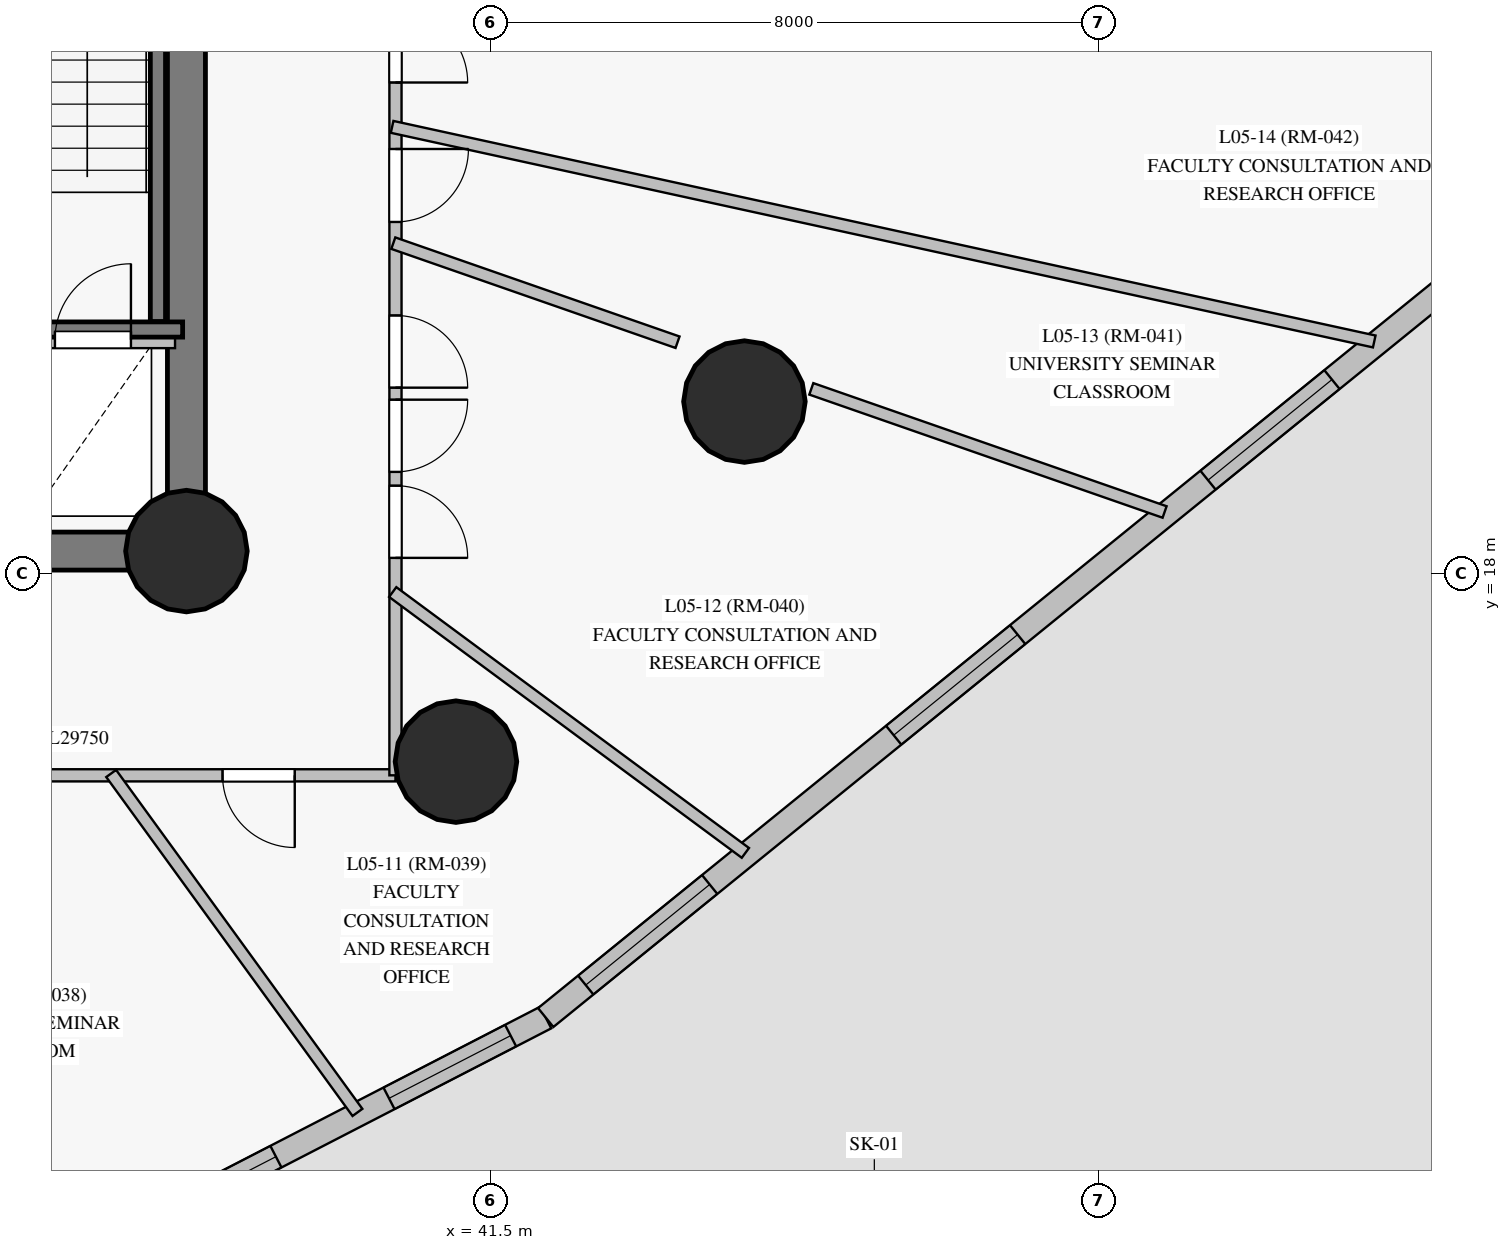
"""IFC4 building model, lengths in metres.
Left out: names, types, materials, properties, quantities, classifications, styles, units other than length and angle.
Written with IfcOpenShell. Run it as: python <this file> out.ifc"""

import sys

from ifc_helpers import new_model, si_unit, direction, frame, frame_2d, origin, origin_with_axes, origin_2d, place, context, subcontext, project, spatial, rectangle, circle, extrude, source, transform, mapped, element, fill, save


model = new_model("IFC4")
c1 = context("Model", 3, precision=1e-05, world=origin(), true_north=direction((0.0, 1.0)))
c2 = subcontext(c1, "Body", "Model", "MODEL_VIEW")
j1 = project(units=[si_unit("LENGTHUNIT", "METRE"), si_unit("PLANEANGLEUNIT", "RADIAN")], contexts=[c1])
p1 = place(None, origin())
s1 = spatial("IfcSite", under=j1, at=p1, CompositionType="ELEMENT")
p2 = place(p1, origin())
s2 = spatial("IfcBuilding", under=s1, at=p2, CompositionType="ELEMENT")
p3 = place(p2, frame((0.0, 0.0, 22.5)))
s3 = spatial("IfcBuildingStorey", under=s2, at=p3, CompositionType="ELEMENT", Elevation=22.5)
p4 = place(p3, frame((26.55, 18.3, 0.0), z_axis=(0.0, 0.0, 1.0), x_axis=(1.0, 0.0, 0.0)))
e1 = element("IfcWall", 1, at=p4, inside=s3, PredefinedType="SHEAR", context=c2, shape_type="SweptSolid", body=[
    extrude(rectangle(XDim=10.95, YDim=0.5, at=frame_2d((5.475, 0.0))), origin(), (0.0, 0.0, 1.0), 3.75),
])
p5 = place(p4, frame((4.55, 0.0, 0.0)))
e2 = element("IfcOpeningElement", 2, at=p5, cuts=e1, PredefinedType="OPENING", context=c2, shape_type="SweptSolid", body=[
    extrude(rectangle(XDim=1.4, YDim=2.2, at=frame_2d((0.7, 1.1))), frame((0.0, 0.26, 0.0), z_axis=(0.0, -1.0, 0.0), x_axis=(1.0, 0.0, 0.0)), (0.0, 0.0, 1.0), 0.52),
])
p6 = place(p3, frame((37.5, 18.3, 0.0), z_axis=(0.0, 0.0, 1.0), x_axis=(0.0, 1.0, 0.0)))
e3 = element("IfcWall", 3, at=p6, inside=s3, PredefinedType="SHEAR", context=c2, shape_type="SweptSolid", body=[
    extrude(rectangle(XDim=16.4, YDim=0.5, at=frame_2d((8.2, 0.0))), origin(), (0.0, 0.0, 1.0), 3.75),
])
p7 = place(p6, frame((14.06, 0.0, 0.0)))
e4 = element("IfcOpeningElement", 4, at=p7, cuts=e3, PredefinedType="OPENING", context=c2, shape_type="SweptSolid", body=[
    extrude(rectangle(XDim=1.2, YDim=2.15, at=frame_2d((0.6, 1.075))), frame((0.0, 0.26, 0.0), z_axis=(0.0, -1.0, 0.0), x_axis=(1.0, 0.0, 0.0)), (0.0, 0.0, 1.0), 0.52),
])
m1 = source(origin_with_axes(), c2, "Body", "SweptSolid", [
    extrude(circle(Radius=0.8, at=origin_2d()), origin(), (0.0, 0.0, 1.0), 4.0),
])
for number, where, z_axis, x_axis in (
    (5, (37.5, 18.3, 0.0), (0.0, 0.0, 1.0), (1.0, 0.0, 0.0)),
    (6, (44.841, 20.267, 0.0), (0.0, 0.0, 1.0), (1.0, 0.0, 0.0)),
    (7, (41.046, 15.53, 0.0), (0.0, 0.0, 1.0), (1.0, 0.0, 0.0)),
):
    element("IfcColumn", number, at=place(p3, frame(where, z_axis=z_axis, x_axis=x_axis)), inside=s3, PredefinedType="COLUMN", context=c2, shape_type="MappedRepresentation", body=[
        mapped(m1, transform((0.0, 0.0, 0.0), scale=1.0)),
    ])
p8 = place(p3, frame((32.221, 7.003, 0.0), z_axis=(0.0, 0.0, 1.0), x_axis=(0.888779978747, 0.458334102352, 0.0)))
e8 = element("IfcWall", 8, at=p8, inside=s3, PredefinedType="SOLIDWALL", context=c2, shape_type="SweptSolid", body=[
    extrude(rectangle(XDim=11.258, YDim=0.32, at=frame_2d((5.629, 0.0))), origin(), (0.0, 0.0, 1.0), 3.75),
])
p9 = place(p8, frame((5.164, 0.0, 0.85)))
e9 = element("IfcOpeningElement", 9, at=p9, cuts=e8, PredefinedType="OPENING", context=c2, shape_type="SweptSolid", body=[
    extrude(rectangle(XDim=2.1, YDim=1.95, at=frame_2d((1.05, 0.975))), frame((0.0, 0.17, 0.0), z_axis=(0.0, -1.0, 0.0), x_axis=(1.0, 0.0, 0.0)), (0.0, 0.0, 1.0), 0.34),
])
p10 = place(p8, frame((8.938, 0.0, 0.85)))
e10 = element("IfcOpeningElement", 10, at=p10, cuts=e8, PredefinedType="OPENING", context=c2, shape_type="SweptSolid", body=[
    extrude(rectangle(XDim=1.8, YDim=1.85, at=frame_2d((0.9, 0.925))), frame((0.0, 0.17, 0.0), z_axis=(0.0, -1.0, 0.0), x_axis=(1.0, 0.0, 0.0)), (0.0, 0.0, 1.0), 0.34),
])
p11 = place(p8, frame((1.351, 0.0, 0.0)))
e11 = element("IfcOpeningElement", 11, at=p11, cuts=e8, PredefinedType="OPENING", context=c2, shape_type="SweptSolid", body=[
    extrude(rectangle(XDim=1.05, YDim=2.12, at=frame_2d((0.525, 1.06))), frame((0.0, 0.17, 0.0), z_axis=(0.0, -1.0, 0.0), x_axis=(1.0, 0.0, 0.0)), (0.0, 0.0, 1.0), 0.34),
])
p12 = place(p3, frame((42.227, 12.163, 0.0), z_axis=(0.0, 0.0, 1.0), x_axis=(0.776540545202, 0.630067283437, 0.0)))
e12 = element("IfcWall", 12, at=p12, inside=s3, PredefinedType="SOLIDWALL", context=c2, shape_type="SweptSolid", body=[
    extrude(rectangle(XDim=16.188, YDim=0.32, at=frame_2d((8.094, 0.0))), origin(), (0.0, 0.0, 1.0), 3.75),
])
p13 = place(p12, frame((0.678, 0.0, 0.85)))
e13 = element("IfcOpeningElement", 13, at=p13, cuts=e12, PredefinedType="OPENING", context=c2, shape_type="SweptSolid", body=[
    extrude(rectangle(XDim=2.1, YDim=1.95, at=frame_2d((1.05, 0.975))), frame((0.0, 0.17, 0.0), z_axis=(0.0, -1.0, 0.0), x_axis=(1.0, 0.0, 0.0)), (0.0, 0.0, 1.0), 0.34),
])
p14 = place(p12, frame((5.896, 0.0, 0.85)))
e14 = element("IfcOpeningElement", 14, at=p14, cuts=e12, PredefinedType="OPENING", context=c2, shape_type="SweptSolid", body=[
    extrude(rectangle(XDim=2.1, YDim=1.95, at=frame_2d((1.05, 0.975))), frame((0.0, 0.17, 0.0), z_axis=(0.0, -1.0, 0.0), x_axis=(1.0, 0.0, 0.0)), (0.0, 0.0, 1.0), 0.34),
])
p15 = place(p12, frame((11.221, 0.0, 0.85)))
e15 = element("IfcOpeningElement", 15, at=p15, cuts=e12, PredefinedType="OPENING", context=c2, shape_type="SweptSolid", body=[
    extrude(rectangle(XDim=2.1, YDim=1.95, at=frame_2d((1.05, 0.975))), frame((0.0, 0.17, 0.0), z_axis=(0.0, -1.0, 0.0), x_axis=(1.0, 0.0, 0.0)), (0.0, 0.0, 1.0), 0.34),
])
p16 = place(p3, frame((35.32, 21.08, 0.0), z_axis=(0.0, 0.0, 1.0), x_axis=(1.0, 0.0, 0.0)))
e16 = element("IfcWall", 16, at=p16, inside=s3, PredefinedType="SHEAR", context=c2, shape_type="SweptSolid", body=[
    extrude(rectangle(XDim=2.03, YDim=0.22, at=frame_2d((1.015, 0.0))), origin(), (0.0, 0.0, 1.0), 2.45),
])
p17 = place(p16, frame((0.45, 0.0, 0.0)))
e17 = element("IfcOpeningElement", 17, at=p17, cuts=e16, PredefinedType="OPENING", context=c2, shape_type="SweptSolid", body=[
    extrude(rectangle(XDim=1.0, YDim=2.05, at=frame_2d((0.5, 1.025))), frame((0.0, 0.12, 0.0), z_axis=(0.0, -1.0, 0.0), x_axis=(1.0, 0.0, 0.0)), (0.0, 0.0, 1.0), 0.24),
])
p18 = place(p3, frame((37.125, 21.32, 0.0), z_axis=(0.0, 0.0, 1.0), x_axis=(0.0, 1.0, 0.0)))
e18 = element("IfcWall", 18, at=p18, inside=s3, PredefinedType="SHEAR", context=c2, shape_type="SweptSolid", body=[
    extrude(rectangle(XDim=7.5, YDim=0.2, at=frame_2d((3.75, 0.0))), origin(), (0.0, 0.0, 1.0), 3.75),
])
p19 = place(p3, frame((33.455, 21.215, 0.0), z_axis=(0.0, 0.0, 1.0), x_axis=(1.0, 0.0, 0.0)))
e19 = element("IfcWall", 19, at=p19, inside=s3, PredefinedType="SHEAR", context=c2, shape_type="SweptSolid", body=[
    extrude(rectangle(XDim=3.995, YDim=0.2, at=frame_2d((1.998, 0.0))), origin(), (0.0, 0.0, 1.0), 3.75),
])
p20 = place(p3, frame((40.25, 15.35, 0.0), z_axis=(0.0, 0.0, 1.0), x_axis=(-1.0, 0.0, 0.0)))
e20 = element("IfcWall", 20, at=p20, inside=s3, PredefinedType="PARTITIONING", context=c2, shape_type="SweptSolid", body=[
    extrude(rectangle(XDim=29.75, YDim=0.16, at=frame_2d((14.875, 0.0))), origin(), (0.0, 0.0, 1.0), 3.1),
])
p21 = place(p20, frame((26.803, 0.0, 0.0)))
e21 = element("IfcOpeningElement", 21, at=p21, cuts=e20, PredefinedType="OPENING", context=c2, shape_type="SweptSolid", body=[
    extrude(rectangle(XDim=0.95, YDim=2.15, at=frame_2d((0.475, 1.075))), frame((0.0, 0.09, 0.0), z_axis=(0.0, -1.0, 0.0), x_axis=(1.0, 0.0, 0.0)), (0.0, 0.0, 1.0), 0.18),
])
p22 = place(p20, frame((23.18, 0.0, 0.0)))
e22 = element("IfcOpeningElement", 22, at=p22, cuts=e20, PredefinedType="OPENING", context=c2, shape_type="SweptSolid", body=[
    extrude(rectangle(XDim=0.95, YDim=2.15, at=frame_2d((0.475, 1.075))), frame((0.0, 0.09, 0.0), z_axis=(0.0, -1.0, 0.0), x_axis=(1.0, 0.0, 0.0)), (0.0, 0.0, 1.0), 0.18),
])
p23 = place(p20, frame((21.097, 0.0, 0.0)))
e23 = element("IfcOpeningElement", 23, at=p23, cuts=e20, PredefinedType="OPENING", context=c2, shape_type="SweptSolid", body=[
    extrude(rectangle(XDim=0.95, YDim=2.15, at=frame_2d((0.475, 1.075))), frame((0.0, 0.09, 0.0), z_axis=(0.0, -1.0, 0.0), x_axis=(1.0, 0.0, 0.0)), (0.0, 0.0, 1.0), 0.18),
])
p24 = place(p20, frame((18.772, 0.0, 0.0)))
e24 = element("IfcOpeningElement", 24, at=p24, cuts=e20, PredefinedType="OPENING", context=c2, shape_type="SweptSolid", body=[
    extrude(rectangle(XDim=0.95, YDim=2.15, at=frame_2d((0.475, 1.075))), frame((0.0, 0.09, 0.0), z_axis=(0.0, -1.0, 0.0), x_axis=(1.0, 0.0, 0.0)), (0.0, 0.0, 1.0), 0.18),
])
p25 = place(p20, frame((16.558, 0.0, 0.0)))
e25 = element("IfcOpeningElement", 25, at=p25, cuts=e20, PredefinedType="OPENING", context=c2, shape_type="SweptSolid", body=[
    extrude(rectangle(XDim=0.86, YDim=2.1, at=frame_2d((0.43, 1.05))), frame((0.0, 0.09, 0.0), z_axis=(0.0, -1.0, 0.0), x_axis=(1.0, 0.0, 0.0)), (0.0, 0.0, 1.0), 0.18),
])
p26 = place(p20, frame((14.4, 0.0, 0.0)))
e26 = element("IfcOpeningElement", 26, at=p26, cuts=e20, PredefinedType="OPENING", context=c2, shape_type="SweptSolid", body=[
    extrude(rectangle(XDim=0.95, YDim=2.15, at=frame_2d((0.475, 1.075))), frame((0.0, 0.09, 0.0), z_axis=(0.0, -1.0, 0.0), x_axis=(1.0, 0.0, 0.0)), (0.0, 0.0, 1.0), 0.18),
])
p27 = place(p20, frame((10.177, 0.0, 0.0)))
e27 = element("IfcOpeningElement", 27, at=p27, cuts=e20, PredefinedType="OPENING", context=c2, shape_type="SweptSolid", body=[
    extrude(rectangle(XDim=0.95, YDim=2.15, at=frame_2d((0.475, 1.075))), frame((0.0, 0.09, 0.0), z_axis=(0.0, -1.0, 0.0), x_axis=(1.0, 0.0, 0.0)), (0.0, 0.0, 1.0), 0.18),
])
p28 = place(p20, frame((6.962, 0.0, 0.0)))
e28 = element("IfcOpeningElement", 28, at=p28, cuts=e20, PredefinedType="OPENING", context=c2, shape_type="SweptSolid", body=[
    extrude(rectangle(XDim=0.96, YDim=2.15, at=frame_2d((0.48, 1.075))), frame((0.0, 0.09, 0.0), z_axis=(0.0, -1.0, 0.0), x_axis=(1.0, 0.0, 0.0)), (0.0, 0.0, 1.0), 0.18),
])
p29 = place(p20, frame((1.325, 0.0, 0.0)))
e29 = element("IfcOpeningElement", 29, at=p29, cuts=e20, PredefinedType="OPENING", context=c2, shape_type="SweptSolid", body=[
    extrude(rectangle(XDim=0.95, YDim=2.15, at=frame_2d((0.475, 1.075))), frame((0.0, 0.09, 0.0), z_axis=(0.0, -1.0, 0.0), x_axis=(1.0, 0.0, 0.0)), (0.0, 0.0, 1.0), 0.18),
])
p30 = place(p3, frame((40.25, 37.65, 0.0), z_axis=(0.0, 0.0, 1.0), x_axis=(0.0, -1.0, 0.0)))
e30 = element("IfcWall", 30, at=p30, inside=s3, PredefinedType="PARTITIONING", context=c2, shape_type="SweptSolid", body=[
    extrude(rectangle(XDim=22.3, YDim=0.16, at=frame_2d((11.15, 0.0))), origin(), (0.0, 0.0, 1.0), 3.15),
])
p31 = place(p30, frame((16.25, 0.0, 0.0)))
e31 = element("IfcOpeningElement", 31, at=p31, cuts=e30, PredefinedType="OPENING", context=c2, shape_type="SweptSolid", body=[
    extrude(rectangle(XDim=0.95, YDim=2.15, at=frame_2d((0.475, 1.075))), frame((0.0, 0.09, 0.0), z_axis=(0.0, -1.0, 0.0), x_axis=(1.0, 0.0, 0.0)), (0.0, 0.0, 1.0), 0.18),
])
p32 = place(p30, frame((14.06, 0.0, 0.0)))
e32 = element("IfcOpeningElement", 32, at=p32, cuts=e30, PredefinedType="OPENING", context=c2, shape_type="SweptSolid", body=[
    extrude(rectangle(XDim=0.96, YDim=2.15, at=frame_2d((0.48, 1.075))), frame((0.0, 0.09, 0.0), z_axis=(0.0, -1.0, 0.0), x_axis=(1.0, 0.0, 0.0)), (0.0, 0.0, 1.0), 0.18),
])
p33 = place(p30, frame((12.235, 0.0, 0.0)))
e33 = element("IfcOpeningElement", 33, at=p33, cuts=e30, PredefinedType="OPENING", context=c2, shape_type="SweptSolid", body=[
    extrude(rectangle(XDim=0.95, YDim=2.15, at=frame_2d((0.475, 1.075))), frame((0.0, 0.09, 0.0), z_axis=(0.0, -1.0, 0.0), x_axis=(1.0, 0.0, 0.0)), (0.0, 0.0, 1.0), 0.18),
])
p34 = place(p30, frame((4.385, 0.0, 0.0)))
e34 = element("IfcOpeningElement", 34, at=p34, cuts=e30, PredefinedType="OPENING", context=c2, shape_type="SweptSolid", body=[
    extrude(rectangle(XDim=0.95, YDim=2.15, at=frame_2d((0.475, 1.075))), frame((0.0, 0.09, 0.0), z_axis=(0.0, -1.0, 0.0), x_axis=(1.0, 0.0, 0.0)), (0.0, 0.0, 1.0), 0.18),
])
p35 = place(p30, frame((2.19, 0.0, 0.0)))
e35 = element("IfcOpeningElement", 35, at=p35, cuts=e30, PredefinedType="OPENING", context=c2, shape_type="SweptSolid", body=[
    extrude(rectangle(XDim=0.95, YDim=2.15, at=frame_2d((0.475, 1.075))), frame((0.0, 0.09, 0.0), z_axis=(0.0, -1.0, 0.0), x_axis=(1.0, 0.0, 0.0)), (0.0, 0.0, 1.0), 0.18),
])
p36 = place(p30, frame((17.358, 0.0, 0.0)))
e36 = element("IfcOpeningElement", 36, at=p36, cuts=e30, PredefinedType="OPENING", context=c2, shape_type="SweptSolid", body=[
    extrude(rectangle(XDim=0.95, YDim=2.15, at=frame_2d((0.475, 1.075))), frame((0.0, 0.09, 0.0), z_axis=(0.0, -1.0, 0.0), x_axis=(1.0, 0.0, 0.0)), (0.0, 0.0, 1.0), 0.18),
])
p37 = place(p30, frame((18.489, 0.0, 0.0)))
e37 = element("IfcOpeningElement", 37, at=p37, cuts=e30, PredefinedType="OPENING", context=c2, shape_type="SweptSolid", body=[
    extrude(rectangle(XDim=0.95, YDim=2.15, at=frame_2d((0.475, 1.075))), frame((0.0, 0.09, 0.0), z_axis=(0.0, -1.0, 0.0), x_axis=(1.0, 0.0, 0.0)), (0.0, 0.0, 1.0), 0.18),
])
p38 = place(p30, frame((10.61, 0.0, 0.0)))
e38 = element("IfcOpeningElement", 38, at=p38, cuts=e30, PredefinedType="OPENING", context=c2, shape_type="SweptSolid", body=[
    extrude(rectangle(XDim=0.86, YDim=2.04, at=frame_2d((0.43, 1.02))), frame((0.0, 0.09, 0.0), z_axis=(0.0, -1.0, 0.0), x_axis=(1.0, 0.0, 0.0)), (0.0, 0.0, 1.0), 0.18),
])
p39 = place(p30, frame((8.378, 0.0, 0.0)))
e39 = element("IfcOpeningElement", 39, at=p39, cuts=e30, PredefinedType="OPENING", context=c2, shape_type="SweptSolid", body=[
    extrude(rectangle(XDim=0.86, YDim=2.04, at=frame_2d((0.43, 1.02))), frame((0.0, 0.09, 0.0), z_axis=(0.0, -1.0, 0.0), x_axis=(1.0, 0.0, 0.0)), (0.0, 0.0, 1.0), 0.18),
])
p40 = place(p30, frame((7.144, 0.0, 0.0)))
e40 = element("IfcOpeningElement", 40, at=p40, cuts=e30, PredefinedType="OPENING", context=c2, shape_type="SweptSolid", body=[
    extrude(rectangle(XDim=0.86, YDim=2.04, at=frame_2d((0.43, 1.02))), frame((0.0, 0.09, 0.0), z_axis=(0.0, -1.0, 0.0), x_axis=(1.0, 0.0, 0.0)), (0.0, 0.0, 1.0), 0.18),
])
p41 = place(p3, frame((40.206, 23.881, 0.0), z_axis=(0.0, 0.0, 1.0), x_axis=(0.976950568719, -0.213465655972, 0.0)))
e41 = element("IfcWall", 41, at=p41, inside=s3, PredefinedType="PARTITIONING", context=c2, shape_type="SweptSolid", body=[
    extrude(rectangle(XDim=13.226, YDim=0.16, at=frame_2d((6.613, 0.0))), origin(), (0.0, 0.0, 1.0), 3.75),
])
p42 = place(p3, frame((40.214, 17.761, 0.0), z_axis=(0.0, 0.0, 1.0), x_axis=(0.803997629738, -0.59463250111, 0.0)))
e42 = element("IfcWall", 42, at=p42, inside=s3, PredefinedType="PARTITIONING", context=c2, shape_type="SweptSolid", body=[
    extrude(rectangle(XDim=5.771, YDim=0.16, at=frame_2d((2.885, 0.0))), origin(), (0.0, 0.0, 1.0), 3.75),
])
p43 = place(p3, frame((36.51, 15.374, 0.0), z_axis=(0.0, 0.0, 1.0), x_axis=(0.587834553636, -0.808981172557, 0.0)))
e43 = element("IfcWall", 43, at=p43, inside=s3, PredefinedType="PARTITIONING", context=c2, shape_type="SweptSolid", body=[
    extrude(rectangle(XDim=5.512, YDim=0.16, at=frame_2d((2.756, 0.0))), origin(), (0.0, 0.0, 1.0), 3.75),
])
p44 = place(p3, frame((45.721, 20.434, 0.0), z_axis=(0.0, 0.0, 1.0), x_axis=(0.944295205847, -0.329099626578, 0.0)))
e44 = element("IfcWall", 44, at=p44, inside=s3, PredefinedType="PARTITIONING", context=c2, shape_type="SweptSolid", body=[
    extrude(rectangle(XDim=4.922, YDim=0.16, at=frame_2d((2.461, 0.0))), origin(), (0.0, 0.0, 1.0), 3.75),
])
p45 = place(p3, frame((40.222, 22.351, 0.0), z_axis=(0.0, 0.0, 1.0), x_axis=(0.944292001394, -0.329108821066, 0.0)))
e45 = element("IfcWall", 45, at=p45, inside=s3, PredefinedType="PARTITIONING", context=c2, shape_type="SweptSolid", body=[
    extrude(rectangle(XDim=3.96, YDim=0.16, at=frame_2d((1.98, 0.0))), origin(), (0.0, 0.0, 1.0), 3.75),
])
m2 = source(origin_with_axes(), c2, "Body", "SweptSolid", [
    extrude(rectangle(XDim=2.1, YDim=1.95, at=frame_2d((1.05, 0.975))), frame((0.0, 0.03, 0.0), z_axis=(0.0, -1.0, 0.0), x_axis=(1.0, 0.0, 0.0)), (0.0, 0.0, 1.0), 0.06),
])
p46 = place(p9, origin())
e46 = element("IfcWindow", 46, at=p46, inside=s3, PartitioningType="SINGLE_PANEL", PredefinedType="WINDOW", context=c2, shape_type="MappedRepresentation", body=[
    mapped(m2, transform((0.0, 0.0, 0.0), scale=1.0)),
])
fill(e9, e46)
m3 = source(origin_with_axes(), c2, "Body", "SweptSolid", [
    extrude(rectangle(XDim=1.8, YDim=1.85, at=frame_2d((0.9, 0.925))), frame((0.0, 0.03, 0.0), z_axis=(0.0, -1.0, 0.0), x_axis=(1.0, 0.0, 0.0)), (0.0, 0.0, 1.0), 0.06),
])
p47 = place(p10, origin())
e47 = element("IfcWindow", 47, at=p47, inside=s3, PartitioningType="SINGLE_PANEL", PredefinedType="WINDOW", context=c2, shape_type="MappedRepresentation", body=[
    mapped(m3, transform((0.0, 0.0, 0.0), scale=1.0)),
])
fill(e10, e47)
p48 = place(p13, origin())
e48 = element("IfcWindow", 48, at=p48, inside=s3, PartitioningType="SINGLE_PANEL", PredefinedType="WINDOW", context=c2, shape_type="MappedRepresentation", body=[
    mapped(m2, transform((0.0, 0.0, 0.0), scale=1.0)),
])
fill(e13, e48)
p49 = place(p14, origin())
e49 = element("IfcWindow", 49, at=p49, inside=s3, PartitioningType="SINGLE_PANEL", PredefinedType="WINDOW", context=c2, shape_type="MappedRepresentation", body=[
    mapped(m2, transform((0.0, 0.0, 0.0), scale=1.0)),
])
fill(e14, e49)
p50 = place(p15, origin())
e50 = element("IfcWindow", 50, at=p50, inside=s3, PartitioningType="SINGLE_PANEL", PredefinedType="WINDOW", context=c2, shape_type="MappedRepresentation", body=[
    mapped(m2, transform((0.0, 0.0, 0.0), scale=1.0)),
])
fill(e15, e50)
m4 = source(origin_with_axes(), c2, "Body", "SweptSolid", [
    extrude(rectangle(XDim=1.0, YDim=2.05, at=frame_2d((0.5, 1.025))), frame((0.0, 0.025, 0.0), z_axis=(0.0, -1.0, 0.0), x_axis=(1.0, 0.0, 0.0)), (0.0, 0.0, 1.0), 0.05),
])
p51 = place(p17, origin())
e51 = element("IfcDoor", 51, at=p51, inside=s3, OperationType="SINGLE_SWING_RIGHT", PredefinedType="TRAPDOOR", context=c2, shape_type="MappedRepresentation", body=[
    mapped(m4, transform((0.0, 0.0, 0.0), scale=1.0)),
])
fill(e17, e51)
m5 = source(origin_with_axes(), c2, "Body", "SweptSolid", [
    extrude(rectangle(XDim=0.95, YDim=2.15, at=frame_2d((0.475, 1.075))), frame((0.0, 0.025, 0.0), z_axis=(0.0, -1.0, 0.0), x_axis=(1.0, 0.0, 0.0)), (0.0, 0.0, 1.0), 0.05),
])
p52 = place(p29, origin())
e52 = element("IfcDoor", 52, at=p52, inside=s3, OperationType="SINGLE_SWING_LEFT", PredefinedType="DOOR", context=c2, shape_type="MappedRepresentation", body=[
    mapped(m5, transform((0.0, 0.0, 0.0), scale=1.0)),
])
fill(e29, e52)
p53 = place(p31, origin())
e53 = element("IfcDoor", 53, at=p53, inside=s3, OperationType="SINGLE_SWING_RIGHT", PredefinedType="DOOR", context=c2, shape_type="MappedRepresentation", body=[
    mapped(m5, transform((0.0, 0.0, 0.0), scale=1.0)),
])
fill(e31, e53)
m6 = source(origin_with_axes(), c2, "Body", "SweptSolid", [
    extrude(rectangle(XDim=0.96, YDim=2.15, at=frame_2d((0.48, 1.075))), frame((0.0, 0.025, 0.0), z_axis=(0.0, -1.0, 0.0), x_axis=(1.0, 0.0, 0.0)), (0.0, 0.0, 1.0), 0.05),
])
p54 = place(p32, origin())
e54 = element("IfcDoor", 54, at=p54, inside=s3, OperationType="SINGLE_SWING_LEFT", PredefinedType="DOOR", context=c2, shape_type="MappedRepresentation", body=[
    mapped(m6, transform((0.0, 0.0, 0.0), scale=1.0)),
])
fill(e32, e54)
p55 = place(p33, origin())
e55 = element("IfcDoor", 55, at=p55, inside=s3, OperationType="SINGLE_SWING_RIGHT", PredefinedType="DOOR", context=c2, shape_type="MappedRepresentation", body=[
    mapped(m5, transform((0.0, 0.0, 0.0), scale=1.0)),
])
fill(e33, e55)
p56 = place(p36, origin())
e56 = element("IfcDoor", 56, at=p56, inside=s3, OperationType="SINGLE_SWING_LEFT", PredefinedType="DOOR", context=c2, shape_type="MappedRepresentation", body=[
    mapped(m5, transform((0.0, 0.0, 0.0), scale=1.0)),
])
fill(e36, e56)
p57 = place(p37, origin())
e57 = element("IfcDoor", 57, at=p57, inside=s3, OperationType="SINGLE_SWING_RIGHT", PredefinedType="DOOR", context=c2, shape_type="MappedRepresentation", body=[
    mapped(m5, transform((0.0, 0.0, 0.0), scale=1.0)),
])
fill(e37, e57)
save(model, sys.argv[1])
